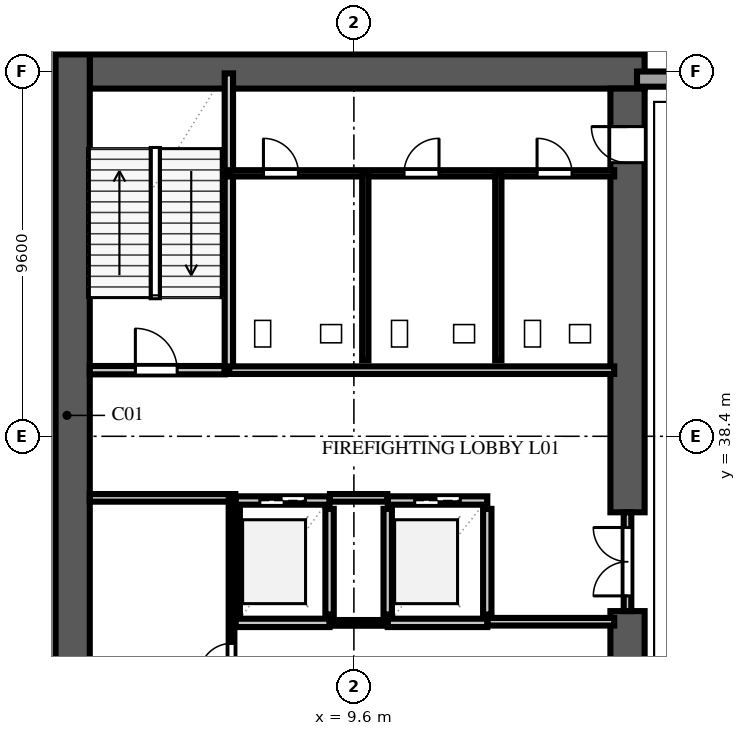
"""IFC4 building model, lengths in metres.
Left out: names, types, materials, properties, quantities, classifications, styles, units other than length and angle.
Written with IfcOpenShell. Run it as: python <this file> out.ifc"""

import sys

from ifc_helpers import new_model, si_unit, direction, frame, frame_2d, origin, place, context, subcontext, project, spatial, rectangle, extrude, element, fill, save


model = new_model("IFC4")
c1 = context("Model", 3, precision=1e-05, world=origin(), true_north=direction((0.0, 1.0)))
c2 = subcontext(c1, "Body", "Model", "MODEL_VIEW")
j1 = project(units=[si_unit("LENGTHUNIT", "METRE"), si_unit("PLANEANGLEUNIT", "RADIAN")], contexts=[c1])
p1 = place(None, origin())
s1 = spatial("IfcSite", under=j1, at=p1, CompositionType="ELEMENT")
p2 = place(p1, origin())
s2 = spatial("IfcBuilding", under=s1, at=p2, CompositionType="ELEMENT")
p3 = place(p2, frame((0.0, 0.0, 5.2)))
s3 = spatial("IfcBuildingStorey", under=s2, at=p3, CompositionType="ELEMENT", Elevation=5.2)
p4 = place(p3, frame((2.65, 48.0, 0.0), z_axis=(0.0, 0.0, 1.0), x_axis=(1.0, 0.0, 0.0)))
e1 = element("IfcWall", 1, at=p4, inside=s3, PredefinedType="SHEAR", context=c2, shape_type="SweptSolid", body=[
    extrude(rectangle(XDim=14.6, YDim=0.9, at=frame_2d((7.3, 0.0))), origin(), (0.0, 0.0, 1.0), 4.86),
])
p5 = place(p3, frame((2.2, 9.15, 0.0), z_axis=(0.0, 0.0, 1.0), x_axis=(0.0, 1.0, 0.0)))
e2 = element("IfcWall", 2, at=p5, inside=s3, PredefinedType="SHEAR", context=c2, shape_type="SweptSolid", body=[
    extrude(rectangle(XDim=39.3, YDim=0.9, at=frame_2d((19.65, 0.0))), origin(), (0.0, 0.0, 1.0), 4.86),
])
p6 = place(p3, frame((16.8, 26.0, 0.0), z_axis=(0.0, 0.0, 1.0), x_axis=(0.0, 1.0, 0.0)))
e3 = element("IfcWall", 3, at=p6, inside=s3, PredefinedType="SHEAR", context=c2, shape_type="SweptSolid", body=[
    extrude(rectangle(XDim=7.8, YDim=0.9, at=frame_2d((3.9, 0.0))), origin(), (0.0, 0.0, 1.0), 4.86),
])
p7 = place(p3, frame((16.8, 36.4, 0.0), z_axis=(0.0, 0.0, 1.0), x_axis=(0.0, 1.0, 0.0)))
e4 = element("IfcWall", 4, at=p7, inside=s3, PredefinedType="SHEAR", context=c2, shape_type="SweptSolid", body=[
    extrude(rectangle(XDim=11.15, YDim=0.9, at=frame_2d((5.575, 0.0))), origin(), (0.0, 0.0, 1.0), 4.86),
])
p8 = place(p7, frame((9.2, 0.0, 0.0)))
e5 = element("IfcOpeningElement", 5, at=p8, cuts=e4, PredefinedType="OPENING", context=c2, shape_type="SweptSolid", body=[
    extrude(rectangle(XDim=0.95, YDim=2.15, at=frame_2d((0.475, 1.075))), frame((0.0, 0.462, 0.0), z_axis=(0.0, -1.0, 0.0), x_axis=(1.0, 0.0, 0.0)), (0.0, 0.0, 1.0), 0.924),
])
p9 = place(p3, frame((17.05, 47.8, 0.0), z_axis=(0.0, 0.0, 1.0), x_axis=(1.0, 0.0, 0.0)))
e6 = element("IfcWall", 6, at=p9, inside=s3, PredefinedType="SOLIDWALL", context=c2, shape_type="SweptSolid", body=[
    extrude(rectangle(XDim=1.35, YDim=0.4, at=frame_2d((0.675, 0.0))), origin(), (0.0, 0.0, 1.0), 4.86),
])
p10 = place(p3, frame((2.65, 40.14, 0.0), z_axis=(0.0, 0.0, 1.0), x_axis=(1.0, 0.0, 0.0)))
e7 = element("IfcWall", 7, at=p10, inside=s3, PredefinedType="SOLIDWALL", context=c2, shape_type="SweptSolid", body=[
    extrude(rectangle(XDim=3.55, YDim=0.22, at=frame_2d((1.775, 0.0))), origin(), (0.0, 0.0, 1.0), 4.86),
])
p11 = place(p10, frame((1.2, 0.0, 0.0)))
e8 = element("IfcOpeningElement", 8, at=p11, cuts=e7, PredefinedType="OPENING", context=c2, shape_type="SweptSolid", body=[
    extrude(rectangle(XDim=1.1, YDim=2.2, at=frame_2d((0.55, 1.1))), frame((0.0, 0.122, 0.0), z_axis=(0.0, -1.0, 0.0), x_axis=(1.0, 0.0, 0.0)), (0.0, 0.0, 1.0), 0.244),
])
p12 = place(p3, frame((6.31, 40.14, 0.0), z_axis=(0.0, 0.0, 1.0), x_axis=(0.0, 1.0, 0.0)))
e9 = element("IfcWall", 9, at=p12, inside=s3, PredefinedType="SOLIDWALL", context=c2, shape_type="SweptSolid", body=[
    extrude(rectangle(XDim=7.81, YDim=0.22, at=frame_2d((3.905, 0.0))), origin(), (0.0, 0.0, 1.0), 4.86),
])
for number, where, z_axis, x_axis in (
    (10, (6.49, 33.71, 0.0), (0.0, 0.0, 1.0), (0.0, 1.0, 0.0)),
    (11, (8.96, 33.71, 0.0), (0.0, 0.0, 1.0), (0.0, 1.0, 0.0)),
):
    element("IfcWall", number, at=place(p3, frame(where, z_axis=z_axis, x_axis=x_axis)), inside=s3, PredefinedType="SOLIDWALL", context=c2, shape_type="SweptSolid", body=[
        extrude(rectangle(XDim=2.78, YDim=0.22, at=frame_2d((1.39, 0.0))), origin(), (0.0, 0.0, 1.0), 4.86),
    ])
p13 = place(p3, frame((6.49, 33.49, 0.0), z_axis=(0.0, 0.0, 1.0), x_axis=(1.0, 0.0, 0.0)))
e12 = element("IfcWall", 12, at=p13, inside=s3, PredefinedType="SOLIDWALL", context=c2, shape_type="SweptSolid", body=[
    extrude(rectangle(XDim=2.47, YDim=0.22, at=frame_2d((1.235, 0.0))), origin(), (0.0, 0.0, 1.0), 4.86),
])
p14 = place(p3, frame((6.49, 36.71, 0.0), z_axis=(0.0, 0.0, 1.0), x_axis=(1.0, 0.0, 0.0)))
e13 = element("IfcWall", 13, at=p14, inside=s3, PredefinedType="SOLIDWALL", context=c2, shape_type="SweptSolid", body=[
    extrude(rectangle(XDim=2.47, YDim=0.22, at=frame_2d((1.235, 0.0))), origin(), (0.0, 0.0, 1.0), 4.86),
])
p15 = place(p14, frame((0.635, 0.0, 0.0)))
e14 = element("IfcOpeningElement", 14, at=p15, cuts=e13, PredefinedType="OPENING", context=c2, shape_type="SweptSolid", body=[
    extrude(rectangle(XDim=1.2, YDim=2.2, at=frame_2d((0.6, 1.1))), frame((0.0, 0.122, 0.0), z_axis=(0.0, -1.0, 0.0), x_axis=(1.0, 0.0, 0.0)), (0.0, 0.0, 1.0), 0.244),
])
for number, where, z_axis, x_axis in (
    (15, (10.49, 33.71, 0.0), (0.0, 0.0, 1.0), (0.0, 1.0, 0.0)),
    (16, (13.11, 33.71, 0.0), (0.0, 0.0, 1.0), (0.0, 1.0, 0.0)),
):
    element("IfcWall", number, at=place(p3, frame(where, z_axis=z_axis, x_axis=x_axis)), inside=s3, PredefinedType="SOLIDWALL", context=c2, shape_type="SweptSolid", body=[
        extrude(rectangle(XDim=2.78, YDim=0.22, at=frame_2d((1.39, 0.0))), origin(), (0.0, 0.0, 1.0), 4.86),
    ])
p16 = place(p3, frame((10.49, 33.49, 0.0), z_axis=(0.0, 0.0, 1.0), x_axis=(1.0, 0.0, 0.0)))
e17 = element("IfcWall", 17, at=p16, inside=s3, PredefinedType="SOLIDWALL", context=c2, shape_type="SweptSolid", body=[
    extrude(rectangle(XDim=2.62, YDim=0.22, at=frame_2d((1.31, 0.0))), origin(), (0.0, 0.0, 1.0), 4.86),
])
p17 = place(p3, frame((10.49, 36.71, 0.0), z_axis=(0.0, 0.0, 1.0), x_axis=(1.0, 0.0, 0.0)))
e18 = element("IfcWall", 18, at=p17, inside=s3, PredefinedType="SOLIDWALL", context=c2, shape_type="SweptSolid", body=[
    extrude(rectangle(XDim=2.62, YDim=0.22, at=frame_2d((1.31, 0.0))), origin(), (0.0, 0.0, 1.0), 4.86),
])
p18 = place(p17, frame((0.71, 0.0, 0.0)))
e19 = element("IfcOpeningElement", 19, at=p18, cuts=e18, PredefinedType="OPENING", context=c2, shape_type="SweptSolid", body=[
    extrude(rectangle(XDim=1.2, YDim=2.2, at=frame_2d((0.6, 1.1))), frame((0.0, 0.122, 0.0), z_axis=(0.0, -1.0, 0.0), x_axis=(1.0, 0.0, 0.0)), (0.0, 0.0, 1.0), 0.244),
])
p19 = place(p3, frame((2.65, 36.78, 0.0), z_axis=(0.0, 0.0, 1.0), x_axis=(1.0, 0.0, 0.0)))
e20 = element("IfcWall", 20, at=p19, inside=s3, PredefinedType="SOLIDWALL", context=c2, shape_type="SweptSolid", body=[
    extrude(rectangle(XDim=3.83, YDim=0.2, at=frame_2d((1.915, 0.0))), origin(), (0.0, 0.0, 1.0), 4.86),
])
p20 = place(p3, frame((8.97, 36.78, 0.0), z_axis=(0.0, 0.0, 1.0), x_axis=(1.0, 0.0, 0.0)))
e21 = element("IfcWall", 21, at=p20, inside=s3, PredefinedType="SOLIDWALL", context=c2, shape_type="SweptSolid", body=[
    extrude(rectangle(XDim=1.51, YDim=0.2, at=frame_2d((0.755, 0.0))), origin(), (0.0, 0.0, 1.0), 4.86),
])
p21 = place(p3, frame((13.12, 33.52, 0.0), z_axis=(0.0, 0.0, 1.0), x_axis=(1.0, 0.0, 0.0)))
e22 = element("IfcWall", 22, at=p21, inside=s3, PredefinedType="SOLIDWALL", context=c2, shape_type="SweptSolid", body=[
    extrude(rectangle(XDim=3.33, YDim=0.2, at=frame_2d((1.665, 0.0))), origin(), (0.0, 0.0, 1.0), 4.86),
])
p22 = place(p3, frame((6.32, 40.14, 0.0), z_axis=(0.0, 0.0, 1.0), x_axis=(1.0, 0.0, 0.0)))
e23 = element("IfcWall", 23, at=p22, inside=s3, PredefinedType="SOLIDWALL", context=c2, shape_type="SweptSolid", body=[
    extrude(rectangle(XDim=10.13, YDim=0.2, at=frame_2d((5.065, 0.0))), origin(), (0.0, 0.0, 1.0), 4.86),
])
p23 = place(p3, frame((16.8, 33.8, 0.0), z_axis=(0.0, 0.0, 1.0), x_axis=(0.0, 1.0, 0.0)))
e24 = element("IfcWall", 24, at=p23, inside=s3, PredefinedType="SOLIDWALL", context=c2, shape_type="SweptSolid", body=[
    extrude(rectangle(XDim=2.6, YDim=0.2, at=frame_2d((1.3, 0.0))), origin(), (0.0, 0.0, 1.0), 4.86),
])
p24 = place(p23, frame((0.4, 0.0, 0.0)))
e25 = element("IfcOpeningElement", 25, at=p24, cuts=e24, PredefinedType="OPENING", context=c2, shape_type="SweptSolid", body=[
    extrude(rectangle(XDim=1.8, YDim=2.2, at=frame_2d((0.9, 1.1))), frame((0.0, 0.112, 0.0), z_axis=(0.0, -1.0, 0.0), x_axis=(1.0, 0.0, 0.0)), (0.0, 0.0, 1.0), 0.224),
])
p25 = place(p3, frame((8.965, 33.49, 0.0), z_axis=(0.0, 0.0, 1.0), x_axis=(1.0, 0.0, 0.0)))
e26 = element("IfcWall", 26, at=p25, inside=s3, PredefinedType="PARTITIONING", context=c2, shape_type="SweptSolid", body=[
    extrude(rectangle(XDim=1.52, YDim=0.15, at=frame_2d((0.76, 0.0))), origin(), (0.0, 0.0, 1.0), 4.86),
])
p26 = place(p3, frame((6.38, 17.8, 0.0), z_axis=(0.0, 0.0, 1.0), x_axis=(0.0, 1.0, 0.0)))
e27 = element("IfcWall", 27, at=p26, inside=s3, PredefinedType="PARTITIONING", context=c2, shape_type="SweptSolid", body=[
    extrude(rectangle(XDim=18.98, YDim=0.15, at=frame_2d((9.49, 0.0))), origin(), (0.0, 0.0, 1.0), 4.86),
])
p27 = place(p26, frame((14.3, 0.0, 0.0)))
e28 = element("IfcOpeningElement", 28, at=p27, cuts=e27, PredefinedType="OPENING", context=c2, shape_type="SweptSolid", body=[
    extrude(rectangle(XDim=0.85, YDim=2.1, at=frame_2d((0.425, 1.05))), frame((0.0, 0.087, 0.0), z_axis=(0.0, -1.0, 0.0), x_axis=(1.0, 0.0, 0.0)), (0.0, 0.0, 1.0), 0.174),
])
p28 = place(p3, frame((6.32, 45.32, 0.0), z_axis=(0.0, 0.0, 1.0), x_axis=(1.0, 0.0, 0.0)))
e29 = element("IfcWall", 29, at=p28, inside=s3, PredefinedType="PLUMBINGWALL", context=c2, shape_type="SweptSolid", body=[
    extrude(rectangle(XDim=10.13, YDim=0.165, at=frame_2d((5.065, 0.0))), origin(), (0.0, 0.0, 1.0), 4.86),
])
p29 = place(p28, frame((0.9, 0.0, 0.0)))
e30 = element("IfcOpeningElement", 30, at=p29, cuts=e29, PredefinedType="OPENING", context=c2, shape_type="SweptSolid", body=[
    extrude(rectangle(XDim=0.92, YDim=2.15, at=frame_2d((0.46, 1.075))), frame((0.0, 0.094, 0.0), z_axis=(0.0, -1.0, 0.0), x_axis=(1.0, 0.0, 0.0)), (0.0, 0.0, 1.0), 0.189),
])
p30 = place(p28, frame((4.6, 0.0, 0.0)))
e31 = element("IfcOpeningElement", 31, at=p30, cuts=e29, PredefinedType="OPENING", context=c2, shape_type="SweptSolid", body=[
    extrude(rectangle(XDim=0.92, YDim=2.15, at=frame_2d((0.46, 1.075))), frame((0.0, 0.094, 0.0), z_axis=(0.0, -1.0, 0.0), x_axis=(1.0, 0.0, 0.0)), (0.0, 0.0, 1.0), 0.189),
])
p31 = place(p28, frame((8.1, 0.0, 0.0)))
e32 = element("IfcOpeningElement", 32, at=p31, cuts=e29, PredefinedType="OPENING", context=c2, shape_type="SweptSolid", body=[
    extrude(rectangle(XDim=0.92, YDim=2.15, at=frame_2d((0.46, 1.075))), frame((0.0, 0.094, 0.0), z_axis=(0.0, -1.0, 0.0), x_axis=(1.0, 0.0, 0.0)), (0.0, 0.0, 1.0), 0.189),
])
for number, where, z_axis, x_axis in (
    (33, (9.9, 40.4, 0.0), (0.0, 0.0, 1.0), (0.0, 1.0, 0.0)),
    (34, (13.4, 40.4, 0.0), (0.0, 0.0, 1.0), (0.0, 1.0, 0.0)),
):
    element("IfcWall", number, at=place(p3, frame(where, z_axis=z_axis, x_axis=x_axis)), inside=s3, PredefinedType="PLUMBINGWALL", context=c2, shape_type="SweptSolid", body=[
        extrude(rectangle(XDim=4.92, YDim=0.165, at=frame_2d((2.46, 0.0))), origin(), (0.0, 0.0, 1.0), 4.86),
    ])
p32 = place(p11, origin())
e35 = element("IfcDoor", 35, at=p32, inside=s3, OperationType="SINGLE_SWING_LEFT", PredefinedType="DOOR", context=c2, shape_type="SweptSolid", body=[
    extrude(rectangle(XDim=1.1, YDim=2.2, at=frame_2d((0.55, 1.1))), frame((0.0, 0.025, 0.0), z_axis=(0.0, -1.0, 0.0), x_axis=(1.0, 0.0, 0.0)), (0.0, 0.0, 1.0), 0.05),
])
fill(e8, e35)
p33 = place(p15, origin())
e36 = element("IfcDoor", 36, at=p33, inside=s3, OperationType="DOUBLE_DOOR_SLIDING", PredefinedType="DOOR", context=c2, shape_type="SweptSolid", body=[
    extrude(rectangle(XDim=1.2, YDim=2.2, at=frame_2d((0.6, 1.1))), frame((0.0, 0.025, 0.0), z_axis=(0.0, -1.0, 0.0), x_axis=(1.0, 0.0, 0.0)), (0.0, 0.0, 1.0), 0.05),
])
fill(e14, e36)
p34 = place(p18, origin())
e37 = element("IfcDoor", 37, at=p34, inside=s3, OperationType="DOUBLE_DOOR_SLIDING", PredefinedType="DOOR", context=c2, shape_type="SweptSolid", body=[
    extrude(rectangle(XDim=1.2, YDim=2.2, at=frame_2d((0.6, 1.1))), frame((0.0, 0.025, 0.0), z_axis=(0.0, -1.0, 0.0), x_axis=(1.0, 0.0, 0.0)), (0.0, 0.0, 1.0), 0.05),
])
fill(e19, e37)
p35 = place(p8, origin())
e38 = element("IfcDoor", 38, at=p35, inside=s3, OperationType="SINGLE_SWING_RIGHT", PredefinedType="DOOR", context=c2, shape_type="SweptSolid", body=[
    extrude(rectangle(XDim=0.95, YDim=2.15, at=frame_2d((0.475, 1.075))), frame((0.0, 0.025, 0.0), z_axis=(0.0, -1.0, 0.0), x_axis=(1.0, 0.0, 0.0)), (0.0, 0.0, 1.0), 0.05),
])
fill(e5, e38)
p36 = place(p24, origin())
e39 = element("IfcDoor", 39, at=p36, inside=s3, OperationType="DOUBLE_DOOR_SINGLE_SWING", PredefinedType="DOOR", context=c2, shape_type="SweptSolid", body=[
    extrude(rectangle(XDim=1.8, YDim=2.2, at=frame_2d((0.9, 1.1))), frame((0.0, 0.025, 0.0), z_axis=(0.0, -1.0, 0.0), x_axis=(1.0, 0.0, 0.0)), (0.0, 0.0, 1.0), 0.05),
])
fill(e25, e39)
p37 = place(p27, origin())
e40 = element("IfcDoor", 40, at=p37, inside=s3, OperationType="SINGLE_SWING_LEFT", PredefinedType="DOOR", context=c2, shape_type="SweptSolid", body=[
    extrude(rectangle(XDim=0.85, YDim=2.1, at=frame_2d((0.425, 1.05))), frame((0.0, 0.025, 0.0), z_axis=(0.0, -1.0, 0.0), x_axis=(1.0, 0.0, 0.0)), (0.0, 0.0, 1.0), 0.05),
])
fill(e28, e40)
p38 = place(p29, origin())
e41 = element("IfcDoor", 41, at=p38, inside=s3, OperationType="SINGLE_SWING_LEFT", PredefinedType="DOOR", context=c2, shape_type="SweptSolid", body=[
    extrude(rectangle(XDim=0.92, YDim=2.15, at=frame_2d((0.46, 1.075))), frame((0.0, 0.025, 0.0), z_axis=(0.0, -1.0, 0.0), x_axis=(1.0, 0.0, 0.0)), (0.0, 0.0, 1.0), 0.05),
])
fill(e30, e41)
p39 = place(p30, origin())
e42 = element("IfcDoor", 42, at=p39, inside=s3, OperationType="SINGLE_SWING_RIGHT", PredefinedType="DOOR", context=c2, shape_type="SweptSolid", body=[
    extrude(rectangle(XDim=0.92, YDim=2.15, at=frame_2d((0.46, 1.075))), frame((0.0, 0.025, 0.0), z_axis=(0.0, -1.0, 0.0), x_axis=(1.0, 0.0, 0.0)), (0.0, 0.0, 1.0), 0.05),
])
fill(e31, e42)
p40 = place(p31, origin())
e43 = element("IfcDoor", 43, at=p40, inside=s3, OperationType="SINGLE_SWING_LEFT", PredefinedType="DOOR", context=c2, shape_type="SweptSolid", body=[
    extrude(rectangle(XDim=0.92, YDim=2.15, at=frame_2d((0.46, 1.075))), frame((0.0, 0.025, 0.0), z_axis=(0.0, -1.0, 0.0), x_axis=(1.0, 0.0, 0.0)), (0.0, 0.0, 1.0), 0.05),
])
fill(e32, e43)
save(model, sys.argv[1])
